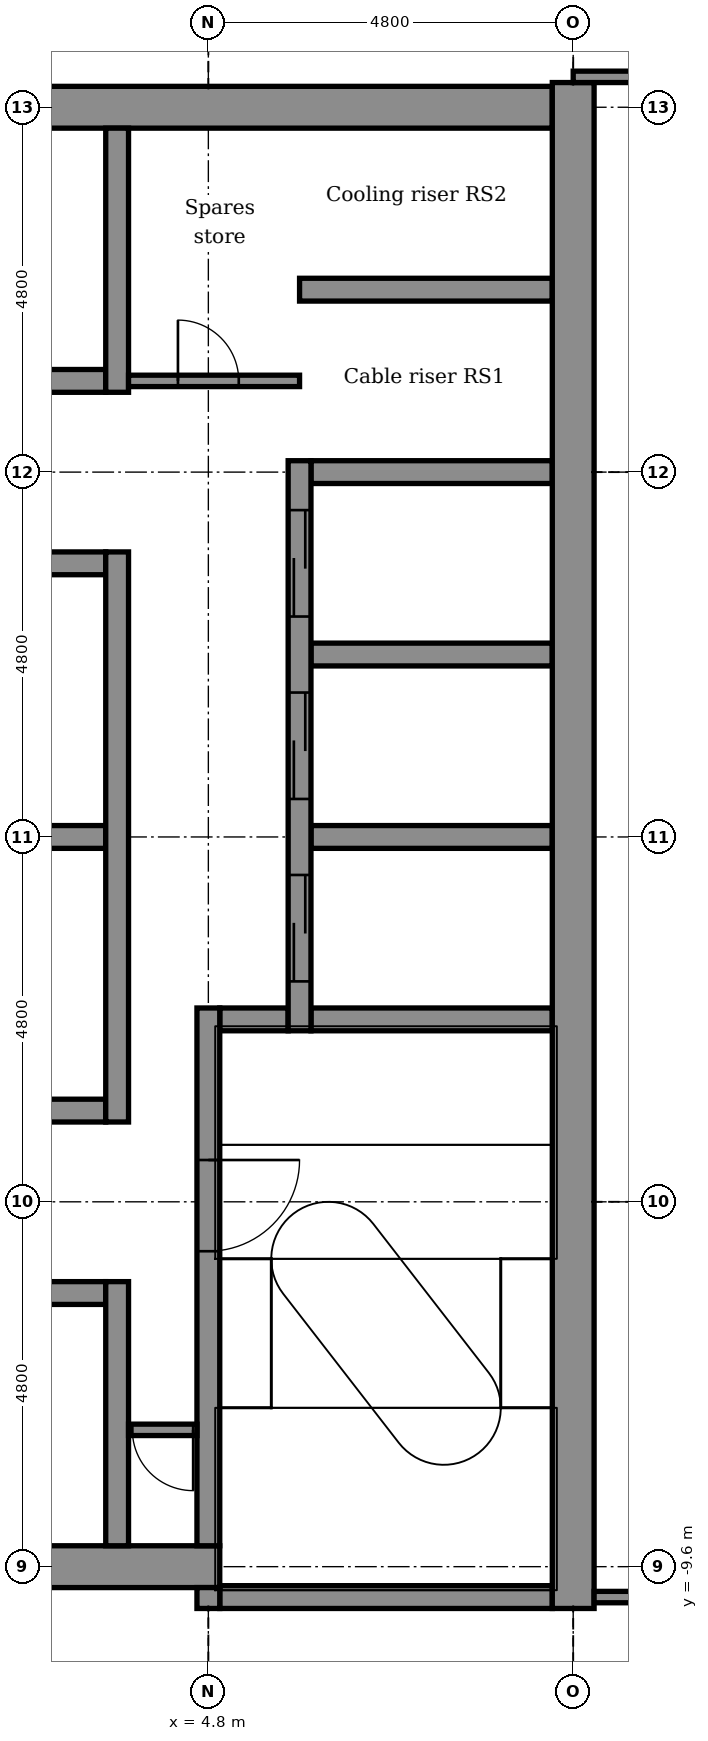
"""IFC4 building model, lengths in metres.
Left out: names, types, materials, properties, quantities, classifications, styles, units other than length and angle.
Written with IfcOpenShell. Run it as: python <this file> out.ifc"""

import sys

from ifc_helpers import new_model, si_unit, direction, frame, frame_2d, origin, place, context, subcontext, project, spatial, rectangle, extrude, element, fill, save


model = new_model("IFC4")
c1 = context("Model", 3, precision=1e-05, world=origin(), true_north=direction((0.0, 1.0)))
c2 = subcontext(c1, "Body", "Model", "MODEL_VIEW")
j1 = project(units=[si_unit("LENGTHUNIT", "METRE"), si_unit("PLANEANGLEUNIT", "RADIAN")], contexts=[c1])
p1 = place(None, origin())
s1 = spatial("IfcSite", under=j1, at=p1, CompositionType="ELEMENT")
p2 = place(p1, origin())
s2 = spatial("IfcBuilding", under=s1, at=p2, CompositionType="ELEMENT")
p3 = place(p2, frame((0.0, 0.0, 296.9)))
s3 = spatial("IfcBuildingStorey", under=s2, at=p3, CompositionType="ELEMENT", Elevation=296.9)
p4 = place(p3, frame((4.95, -10.0, -0.3), z_axis=(0.0, 0.0, 1.0), x_axis=(1.0, 0.0, 0.0)))
e1 = element("IfcWall", 1, at=p4, inside=s3, PredefinedType="STANDARD", context=c2, shape_type="SweptSolid", body=[
    extrude(rectangle(XDim=4.375, YDim=0.3, at=frame_2d((2.188, 0.0))), origin(), (0.0, 0.0, 1.0), 5.0),
])
p5 = place(p3, frame((-5.25, -9.6, -0.3), z_axis=(0.0, 0.0, 1.0), x_axis=(1.0, 0.0, 0.0)))
e2 = element("IfcWall", 2, at=p5, inside=s3, PredefinedType="SHEAR", context=c2, shape_type="SweptSolid", body=[
    extrude(rectangle(XDim=10.2, YDim=0.55, at=frame_2d((5.1, 0.0))), origin(), (0.0, 0.0, 1.0), 5.0),
])
p6 = place(p5, frame((0.6, 0.0, 0.3)))
e3 = element("IfcOpeningElement", 3, at=p6, cuts=e2, PredefinedType="OPENING", context=c2, shape_type="SweptSolid", body=[
    extrude(rectangle(XDim=0.9, YDim=2.1, at=frame_2d((0.45, 1.05))), frame((0.0, 0.285, 0.0), z_axis=(0.0, -1.0, 0.0), x_axis=(1.0, 0.0, 0.0)), (0.0, 0.0, 1.0), 0.57),
])
for number, where, z_axis, x_axis in (
    (4, (1.35, -6.0, -0.3), (0.0, 0.0, 1.0), (1.0, 0.0, 0.0)),
    (5, (1.35, -3.6, -0.3), (0.0, 0.0, 1.0), (1.0, 0.0, 0.0)),
):
    element("IfcWall", number, at=place(p3, frame(where, z_axis=z_axis, x_axis=x_axis)), inside=s3, PredefinedType="STANDARD", context=c2, shape_type="SweptSolid", body=[
        extrude(rectangle(XDim=2.1, YDim=0.3, at=frame_2d((1.05, 0.0))), origin(), (0.0, 0.0, 1.0), 0.8),
    ])
p7 = place(p3, frame((4.95, -2.4, -0.3), z_axis=(0.0, 0.0, 1.0), x_axis=(1.0, 0.0, 0.0)))
e6 = element("IfcWall", 6, at=p7, inside=s3, PredefinedType="STANDARD", context=c2, shape_type="SweptSolid", body=[
    extrude(rectangle(XDim=0.9, YDim=0.3, at=frame_2d((0.45, 0.0))), origin(), (0.0, 0.0, 1.0), 5.0),
])
p8 = place(p3, frame((6.15, -2.4, -0.3), z_axis=(0.0, 0.0, 1.0), x_axis=(1.0, 0.0, 0.0)))
e7 = element("IfcWall", 7, at=p8, inside=s3, PredefinedType="STANDARD", context=c2, shape_type="SweptSolid", body=[
    extrude(rectangle(XDim=3.175, YDim=0.3, at=frame_2d((1.587, 0.0))), origin(), (0.0, 0.0, 1.0), 5.0),
])
p9 = place(p3, frame((1.35, 0.0, -0.3), z_axis=(0.0, 0.0, 1.0), x_axis=(1.0, 0.0, 0.0)))
e8 = element("IfcWall", 8, at=p9, inside=s3, PredefinedType="STANDARD", context=c2, shape_type="SweptSolid", body=[
    extrude(rectangle(XDim=2.1, YDim=0.3, at=frame_2d((1.05, 0.0))), origin(), (0.0, 0.0, 1.0), 0.8),
])
for number, where, z_axis, x_axis in (
    (9, (6.15, 0.0, -0.3), (0.0, 0.0, 1.0), (1.0, 0.0, 0.0)),
    (10, (6.15, 2.4, -0.3), (0.0, 0.0, 1.0), (1.0, 0.0, 0.0)),
):
    element("IfcWall", number, at=place(p3, frame(where, z_axis=z_axis, x_axis=x_axis)), inside=s3, PredefinedType="STANDARD", context=c2, shape_type="SweptSolid", body=[
        extrude(rectangle(XDim=3.175, YDim=0.3, at=frame_2d((1.587, 0.0))), origin(), (0.0, 0.0, 1.0), 5.0),
    ])
p10 = place(p3, frame((1.35, 3.6, -0.3), z_axis=(0.0, 0.0, 1.0), x_axis=(1.0, 0.0, 0.0)))
e11 = element("IfcWall", 11, at=p10, inside=s3, PredefinedType="STANDARD", context=c2, shape_type="SweptSolid", body=[
    extrude(rectangle(XDim=2.1, YDim=0.3, at=frame_2d((1.05, 0.0))), origin(), (0.0, 0.0, 1.0), 0.8),
])
p11 = place(p3, frame((6.15, 4.8, -0.3), z_axis=(0.0, 0.0, 1.0), x_axis=(1.0, 0.0, 0.0)))
e12 = element("IfcWall", 12, at=p11, inside=s3, PredefinedType="STANDARD", context=c2, shape_type="SweptSolid", body=[
    extrude(rectangle(XDim=3.175, YDim=0.3, at=frame_2d((1.587, 0.0))), origin(), (0.0, 0.0, 1.0), 5.0),
])
p12 = place(p3, frame((1.35, 6.0, -0.3), z_axis=(0.0, 0.0, 1.0), x_axis=(1.0, 0.0, 0.0)))
e13 = element("IfcWall", 13, at=p12, inside=s3, PredefinedType="STANDARD", context=c2, shape_type="SweptSolid", body=[
    extrude(rectangle(XDim=2.1, YDim=0.3, at=frame_2d((1.05, 0.0))), origin(), (0.0, 0.0, 1.0), 0.8),
])
p13 = place(p3, frame((6.0, 7.2, -0.3), z_axis=(0.0, 0.0, 1.0), x_axis=(1.0, 0.0, 0.0)))
e14 = element("IfcWall", 14, at=p13, inside=s3, PredefinedType="STANDARD", context=c2, shape_type="SweptSolid", body=[
    extrude(rectangle(XDim=3.325, YDim=0.3, at=frame_2d((1.663, 0.0))), origin(), (0.0, 0.0, 1.0), 5.0),
])
p14 = place(p3, frame((-5.25, 9.6, -0.3), z_axis=(0.0, 0.0, 1.0), x_axis=(1.0, 0.0, 0.0)))
e15 = element("IfcWall", 15, at=p14, inside=s3, PredefinedType="SHEAR", context=c2, shape_type="SweptSolid", body=[
    extrude(rectangle(XDim=14.575, YDim=0.55, at=frame_2d((7.288, 0.0))), origin(), (0.0, 0.0, 1.0), 5.0),
])
p15 = place(p14, frame((0.6, 0.0, 0.3)))
e16 = element("IfcOpeningElement", 16, at=p15, cuts=e15, PredefinedType="OPENING", context=c2, shape_type="SweptSolid", body=[
    extrude(rectangle(XDim=0.9, YDim=2.1, at=frame_2d((0.45, 1.05))), frame((0.0, 0.285, 0.0), z_axis=(0.0, -1.0, 0.0), x_axis=(1.0, 0.0, 0.0)), (0.0, 0.0, 1.0), 0.57),
])
p16 = place(p3, frame((3.6, -9.325, -0.3), z_axis=(0.0, 0.0, 1.0), x_axis=(0.0, 1.0, 0.0)))
e17 = element("IfcWall", 17, at=p16, inside=s3, PredefinedType="STANDARD", context=c2, shape_type="SweptSolid", body=[
    extrude(rectangle(XDim=3.475, YDim=0.3, at=frame_2d((1.737, 0.0))), origin(), (0.0, 0.0, 1.0), 0.8),
])
p17 = place(p3, frame((3.6, -3.75, -0.3), z_axis=(0.0, 0.0, 1.0), x_axis=(0.0, 1.0, 0.0)))
e18 = element("IfcWall", 18, at=p17, inside=s3, PredefinedType="STANDARD", context=c2, shape_type="SweptSolid", body=[
    extrude(rectangle(XDim=7.5, YDim=0.3, at=frame_2d((3.75, 0.0))), origin(), (0.0, 0.0, 1.0), 0.8),
])
p18 = place(p3, frame((3.6, 5.85, -0.3), z_axis=(0.0, 0.0, 1.0), x_axis=(0.0, 1.0, 0.0)))
e19 = element("IfcWall", 19, at=p18, inside=s3, PredefinedType="STANDARD", context=c2, shape_type="SweptSolid", body=[
    extrude(rectangle(XDim=3.475, YDim=0.3, at=frame_2d((1.737, 0.0))), origin(), (0.0, 0.0, 1.0), 0.8),
])
p19 = place(p3, frame((4.8, -10.15, -0.3), z_axis=(0.0, 0.0, 1.0), x_axis=(0.0, 1.0, 0.0)))
e20 = element("IfcWall", 20, at=p19, inside=s3, PredefinedType="STANDARD", context=c2, shape_type="SweptSolid", body=[
    extrude(rectangle(XDim=0.275, YDim=0.3, at=frame_2d((0.137, 0.0))), origin(), (0.0, 0.0, 1.0), 5.0),
])
p20 = place(p3, frame((4.8, -9.325, -0.3), z_axis=(0.0, 0.0, 1.0), x_axis=(0.0, 1.0, 0.0)))
e21 = element("IfcWall", 21, at=p20, inside=s3, PredefinedType="STANDARD", context=c2, shape_type="SweptSolid", body=[
    extrude(rectangle(XDim=7.075, YDim=0.3, at=frame_2d((3.538, 0.0))), origin(), (0.0, 0.0, 1.0), 5.0),
])
p21 = place(p20, frame((3.875, 0.0, 0.3)))
e22 = element("IfcOpeningElement", 22, at=p21, cuts=e21, PredefinedType="OPENING", context=c2, shape_type="SweptSolid", body=[
    extrude(rectangle(XDim=1.2, YDim=2.1, at=frame_2d((0.6, 1.05))), frame((0.0, 0.16, 0.0), z_axis=(0.0, -1.0, 0.0), x_axis=(1.0, 0.0, 0.0)), (0.0, 0.0, 1.0), 0.32),
])
p22 = place(p3, frame((6.0, -2.55, -0.3), z_axis=(0.0, 0.0, 1.0), x_axis=(0.0, 1.0, 0.0)))
e23 = element("IfcWall", 23, at=p22, inside=s3, PredefinedType="STANDARD", context=c2, shape_type="SweptSolid", body=[
    extrude(rectangle(XDim=7.5, YDim=0.3, at=frame_2d((3.75, 0.0))), origin(), (0.0, 0.0, 1.0), 5.0),
])
p23 = place(p22, frame((0.65, 0.0, 0.3)))
e24 = element("IfcOpeningElement", 24, at=p23, cuts=e23, PredefinedType="OPENING", context=c2, shape_type="SweptSolid", body=[
    extrude(rectangle(XDim=1.4, YDim=2.1, at=frame_2d((0.7, 1.05))), frame((0.0, 0.16, 0.0), z_axis=(0.0, -1.0, 0.0), x_axis=(1.0, 0.0, 0.0)), (0.0, 0.0, 1.0), 0.32),
])
p24 = place(p22, frame((3.05, 0.0, 0.3)))
e25 = element("IfcOpeningElement", 25, at=p24, cuts=e23, PredefinedType="OPENING", context=c2, shape_type="SweptSolid", body=[
    extrude(rectangle(XDim=1.4, YDim=2.1, at=frame_2d((0.7, 1.05))), frame((0.0, 0.16, 0.0), z_axis=(0.0, -1.0, 0.0), x_axis=(1.0, 0.0, 0.0)), (0.0, 0.0, 1.0), 0.32),
])
p25 = place(p22, frame((5.45, 0.0, 0.3)))
e26 = element("IfcOpeningElement", 26, at=p25, cuts=e23, PredefinedType="OPENING", context=c2, shape_type="SweptSolid", body=[
    extrude(rectangle(XDim=1.4, YDim=2.1, at=frame_2d((0.7, 1.05))), frame((0.0, 0.16, 0.0), z_axis=(0.0, -1.0, 0.0), x_axis=(1.0, 0.0, 0.0)), (0.0, 0.0, 1.0), 0.32),
])
p26 = place(p3, frame((9.6, -10.15, -0.3), z_axis=(0.0, 0.0, 1.0), x_axis=(0.0, 1.0, 0.0)))
e27 = element("IfcWall", 27, at=p26, inside=s3, PredefinedType="SHEAR", context=c2, shape_type="SweptSolid", body=[
    extrude(rectangle(XDim=20.075, YDim=0.55, at=frame_2d((10.038, 0.0))), origin(), (0.0, 0.0, 1.0), 5.0),
])
p27 = place(p3, frame((9.875, -10.0, 0.0), z_axis=(0.0, 0.0, 1.0), x_axis=(1.0, 0.0, 0.0)))
e28 = element("IfcWall", 28, at=p27, inside=s3, PredefinedType="PARTITIONING", context=c2, shape_type="SweptSolid", body=[
    extrude(rectangle(XDim=3.413, YDim=0.15, at=frame_2d((1.707, 0.0))), origin(), (0.0, 0.0, 1.0), 4.7),
])
p28 = place(p3, frame((3.75, -7.8, 0.0), z_axis=(0.0, 0.0, 1.0), x_axis=(1.0, 0.0, 0.0)))
e29 = element("IfcWall", 29, at=p28, inside=s3, PredefinedType="PARTITIONING", context=c2, shape_type="SweptSolid", body=[
    extrude(rectangle(XDim=0.9, YDim=0.15, at=frame_2d((0.45, 0.0))), origin(), (0.0, 0.0, 1.0), 4.7),
])
p29 = place(p28, frame((0.05, 0.0, 0.0)))
e30 = element("IfcOpeningElement", 30, at=p29, cuts=e29, PredefinedType="OPENING", context=c2, shape_type="SweptSolid", body=[
    extrude(rectangle(XDim=0.8, YDim=2.1, at=frame_2d((0.4, 1.05))), frame((0.0, 0.085, 0.0), z_axis=(0.0, -1.0, 0.0), x_axis=(1.0, 0.0, 0.0)), (0.0, 0.0, 1.0), 0.17),
])
p30 = place(p3, frame((3.75, 6.0, 0.0), z_axis=(0.0, 0.0, 1.0), x_axis=(1.0, 0.0, 0.0)))
e31 = element("IfcWall", 31, at=p30, inside=s3, PredefinedType="PARTITIONING", context=c2, shape_type="SweptSolid", body=[
    extrude(rectangle(XDim=2.25, YDim=0.15, at=frame_2d((1.125, 0.0))), origin(), (0.0, 0.0, 1.0), 4.7),
])
p31 = place(p30, frame((0.65, 0.0, 0.0)))
e32 = element("IfcOpeningElement", 32, at=p31, cuts=e31, PredefinedType="OPENING", context=c2, shape_type="SweptSolid", body=[
    extrude(rectangle(XDim=0.8, YDim=2.1, at=frame_2d((0.4, 1.05))), frame((0.0, 0.085, 0.0), z_axis=(0.0, -1.0, 0.0), x_axis=(1.0, 0.0, 0.0)), (0.0, 0.0, 1.0), 0.17),
])
p32 = place(p3, frame((9.6, 10.0, 0.0), z_axis=(0.0, 0.0, 1.0), x_axis=(1.0, 0.0, 0.0)))
e33 = element("IfcWall", 33, at=p32, inside=s3, PredefinedType="PARTITIONING", context=c2, shape_type="SweptSolid", body=[
    extrude(rectangle(XDim=3.688, YDim=0.15, at=frame_2d((1.844, 0.0))), origin(), (0.0, 0.0, 1.0), 4.7),
])
p33 = place(p32, frame((1.413, 0.0, 0.0)))
e34 = element("IfcOpeningElement", 34, at=p33, cuts=e33, PredefinedType="OPENING", context=c2, shape_type="SweptSolid", body=[
    extrude(rectangle(XDim=1.0, YDim=2.1, at=frame_2d((0.5, 1.05))), frame((0.0, 0.085, 0.0), z_axis=(0.0, -1.0, 0.0), x_axis=(1.0, 0.0, 0.0)), (0.0, 0.0, 1.0), 0.17),
])
p34 = place(p31, origin())
e35 = element("IfcDoor", 35, at=p34, inside=s3, OperationType="SINGLE_SWING_LEFT", PredefinedType="DOOR", context=c2, shape_type="SweptSolid", body=[
    extrude(rectangle(XDim=0.8, YDim=2.1, at=frame_2d((0.4, 1.05))), frame((0.0, 0.025, 0.0), z_axis=(0.0, -1.0, 0.0), x_axis=(1.0, 0.0, 0.0)), (0.0, 0.0, 1.0), 0.05),
])
fill(e32, e35)
p35 = place(p29, frame((0.8, 0.0, 0.0), z_axis=(0.0, 0.0, 1.0), x_axis=(-1.0, 0.0, 0.0)))
e36 = element("IfcDoor", 36, at=p35, inside=s3, OperationType="SINGLE_SWING_RIGHT", PredefinedType="DOOR", context=c2, shape_type="SweptSolid", body=[
    extrude(rectangle(XDim=0.8, YDim=2.1, at=frame_2d((0.4, 1.05))), frame((0.0, 0.025, 0.0), z_axis=(0.0, -1.0, 0.0), x_axis=(1.0, 0.0, 0.0)), (0.0, 0.0, 1.0), 0.05),
])
fill(e30, e36)
p36 = place(p23, origin())
e37 = element("IfcDoor", 37, at=p36, inside=s3, OperationType="DOUBLE_DOOR_SLIDING", PredefinedType="DOOR", context=c2, shape_type="SweptSolid", body=[
    extrude(rectangle(XDim=1.4, YDim=2.1, at=frame_2d((0.7, 1.05))), frame((0.0, 0.025, 0.0), z_axis=(0.0, -1.0, 0.0), x_axis=(1.0, 0.0, 0.0)), (0.0, 0.0, 1.0), 0.05),
])
fill(e24, e37)
p37 = place(p24, origin())
e38 = element("IfcDoor", 38, at=p37, inside=s3, OperationType="DOUBLE_DOOR_SLIDING", PredefinedType="DOOR", context=c2, shape_type="SweptSolid", body=[
    extrude(rectangle(XDim=1.4, YDim=2.1, at=frame_2d((0.7, 1.05))), frame((0.0, 0.025, 0.0), z_axis=(0.0, -1.0, 0.0), x_axis=(1.0, 0.0, 0.0)), (0.0, 0.0, 1.0), 0.05),
])
fill(e25, e38)
p38 = place(p25, origin())
e39 = element("IfcDoor", 39, at=p38, inside=s3, OperationType="DOUBLE_DOOR_SLIDING", PredefinedType="DOOR", context=c2, shape_type="SweptSolid", body=[
    extrude(rectangle(XDim=1.4, YDim=2.1, at=frame_2d((0.7, 1.05))), frame((0.0, 0.025, 0.0), z_axis=(0.0, -1.0, 0.0), x_axis=(1.0, 0.0, 0.0)), (0.0, 0.0, 1.0), 0.05),
])
fill(e26, e39)
p39 = place(p21, frame((1.2, 0.0, 0.0), z_axis=(0.0, 0.0, 1.0), x_axis=(-1.0, 0.0, 0.0)))
e40 = element("IfcDoor", 40, at=p39, inside=s3, OperationType="SINGLE_SWING_RIGHT", PredefinedType="DOOR", context=c2, shape_type="SweptSolid", body=[
    extrude(rectangle(XDim=1.2, YDim=2.1, at=frame_2d((0.6, 1.05))), frame((0.0, 0.025, 0.0), z_axis=(0.0, -1.0, 0.0), x_axis=(1.0, 0.0, 0.0)), (0.0, 0.0, 1.0), 0.05),
])
fill(e22, e40)
save(model, sys.argv[1])
